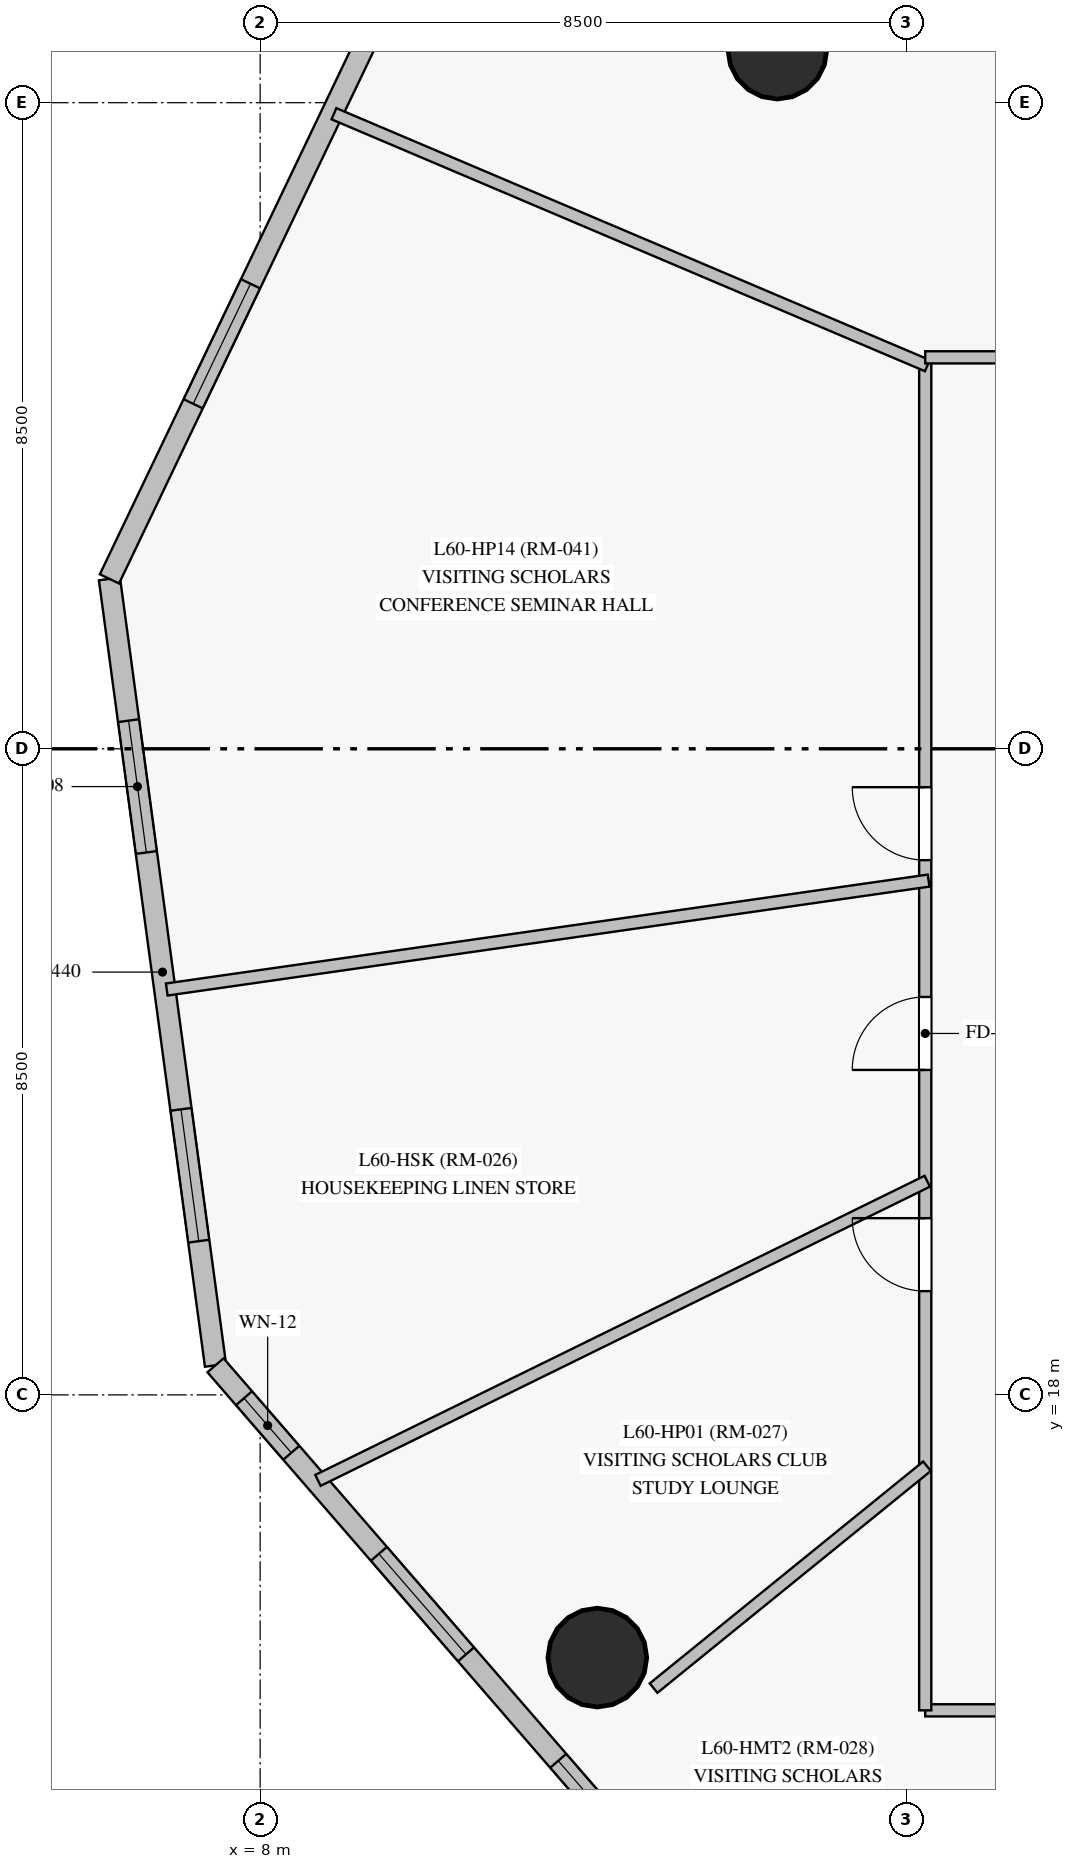
"""IFC4 building model, lengths in metres.
Left out: names, types, materials, properties, quantities, classifications, styles, units other than length and angle.
Written with IfcOpenShell. Run it as: python <this file> out.ifc"""

import sys

from ifc_helpers import new_model, si_unit, direction, frame, frame_2d, origin, origin_with_axes, origin_2d, place, context, subcontext, project, spatial, rectangle, circle, extrude, source, transform, mapped, element, fill, save


model = new_model("IFC4")
c1 = context("Model", 3, precision=1e-05, world=origin(), true_north=direction((0.0, 1.0)))
c2 = subcontext(c1, "Body", "Model", "MODEL_VIEW")
j1 = project(units=[si_unit("LENGTHUNIT", "METRE"), si_unit("PLANEANGLEUNIT", "RADIAN")], contexts=[c1])
p1 = place(None, origin())
s1 = spatial("IfcSite", under=j1, at=p1, CompositionType="ELEMENT")
p2 = place(p1, origin())
s2 = spatial("IfcBuilding", under=s1, at=p2, CompositionType="ELEMENT")
p3 = place(p2, frame((0.0, 0.0, 205.35)))
s3 = spatial("IfcBuildingStorey", under=s2, at=p3, CompositionType="ELEMENT", Elevation=205.35)
m1 = source(origin_with_axes(), c2, "Body", "SweptSolid", [
    extrude(circle(Radius=0.65, at=origin_2d()), origin(), (0.0, 0.0, 1.0), 3.05),
])
for number, where, z_axis, x_axis in (
    (1, (14.805, 35.698, 0.0), (0.0, 0.0, 1.0), (1.0, 0.0, 0.0)),
    (2, (12.436, 14.544, 0.0), (0.0, 0.0, 1.0), (1.0, 0.0, 0.0)),
):
    element("IfcColumn", number, at=place(p3, frame(where, z_axis=z_axis, x_axis=x_axis)), inside=s3, PredefinedType="COLUMN", context=c2, shape_type="MappedRepresentation", body=[
        mapped(m1, transform((0.0, 0.0, 0.0), scale=1.0)),
    ])
p4 = place(p3, frame((6.018, 28.735, 0.0), z_axis=(0.0, 0.0, 1.0), x_axis=(0.133628013706, -0.991031560523, 0.0)))
e3 = element("IfcWall", 3, at=p4, inside=s3, PredefinedType="SOLIDWALL", context=c2, shape_type="SweptSolid", body=[
    extrude(rectangle(XDim=10.439, YDim=0.28, at=frame_2d((5.22, 0.0))), origin(), (0.0, 0.0, 1.0), 2.775),
])
p5 = place(p4, frame((1.882, 0.0, 0.85)))
e4 = element("IfcOpeningElement", 4, at=p5, cuts=e3, PredefinedType="OPENING", context=c2, shape_type="SweptSolid", body=[
    extrude(rectangle(XDim=1.75, YDim=1.65, at=frame_2d((0.875, 0.825))), frame((0.0, 0.15, 0.0), z_axis=(0.0, -1.0, 0.0), x_axis=(1.0, 0.0, 0.0)), (0.0, 0.0, 1.0), 0.3),
])
p6 = place(p4, frame((7.042, 0.0, 0.85)))
e5 = element("IfcOpeningElement", 5, at=p6, cuts=e3, PredefinedType="OPENING", context=c2, shape_type="SweptSolid", body=[
    extrude(rectangle(XDim=1.75, YDim=1.65, at=frame_2d((0.875, 0.825))), frame((0.0, 0.15, 0.0), z_axis=(0.0, -1.0, 0.0), x_axis=(1.0, 0.0, 0.0)), (0.0, 0.0, 1.0), 0.3),
])
p7 = place(p3, frame((7.413, 18.389, 0.0), z_axis=(0.0, 0.0, 1.0), x_axis=(0.654908577936, -0.755708114648, 0.0)))
e6 = element("IfcWall", 6, at=p7, inside=s3, PredefinedType="SOLIDWALL", context=c2, shape_type="SweptSolid", body=[
    extrude(rectangle(XDim=13.544, YDim=0.28, at=frame_2d((6.772, 0.0))), origin(), (0.0, 0.0, 1.0), 2.775),
])
p8 = place(p7, frame((0.573, 0.0, 0.85)))
e7 = element("IfcOpeningElement", 7, at=p8, cuts=e6, PredefinedType="OPENING", context=c2, shape_type="SweptSolid", body=[
    extrude(rectangle(XDim=0.95, YDim=1.5, at=frame_2d((0.475, 0.75))), frame((0.0, 0.15, 0.0), z_axis=(0.0, -1.0, 0.0), x_axis=(1.0, 0.0, 0.0)), (0.0, 0.0, 1.0), 0.3),
])
p9 = place(p7, frame((3.282, 0.0, 0.85)))
e8 = element("IfcOpeningElement", 8, at=p9, cuts=e6, PredefinedType="OPENING", context=c2, shape_type="SweptSolid", body=[
    extrude(rectangle(XDim=1.75, YDim=1.65, at=frame_2d((0.875, 0.825))), frame((0.0, 0.15, 0.0), z_axis=(0.0, -1.0, 0.0), x_axis=(1.0, 0.0, 0.0)), (0.0, 0.0, 1.0), 0.3),
])
p10 = place(p7, frame((6.885, 0.0, 0.85)))
e9 = element("IfcOpeningElement", 9, at=p10, cuts=e6, PredefinedType="OPENING", context=c2, shape_type="SweptSolid", body=[
    extrude(rectangle(XDim=1.75, YDim=1.65, at=frame_2d((0.875, 0.825))), frame((0.0, 0.15, 0.0), z_axis=(0.0, -1.0, 0.0), x_axis=(1.0, 0.0, 0.0)), (0.0, 0.0, 1.0), 0.3),
])
p11 = place(p7, frame((10.488, 0.0, 0.85)))
e10 = element("IfcOpeningElement", 10, at=p11, cuts=e6, PredefinedType="OPENING", context=c2, shape_type="SweptSolid", body=[
    extrude(rectangle(XDim=1.75, YDim=1.65, at=frame_2d((0.875, 0.825))), frame((0.0, 0.15, 0.0), z_axis=(0.0, -1.0, 0.0), x_axis=(1.0, 0.0, 0.0)), (0.0, 0.0, 1.0), 0.3),
])
p12 = place(p3, frame((11.86, 40.955, 0.0), z_axis=(0.0, 0.0, 1.0), x_axis=(-0.431338769866, -0.902190038523, 0.0)))
e11 = element("IfcWall", 11, at=p12, inside=s3, PredefinedType="SOLIDWALL", context=c2, shape_type="SweptSolid", body=[
    extrude(rectangle(XDim=13.544, YDim=0.28, at=frame_2d((6.772, 0.0))), origin(), (0.0, 0.0, 1.0), 2.775),
])
p13 = place(p12, frame((2.529, 0.0, 0.85)))
e12 = element("IfcOpeningElement", 12, at=p13, cuts=e11, PredefinedType="OPENING", context=c2, shape_type="SweptSolid", body=[
    extrude(rectangle(XDim=1.75, YDim=1.65, at=frame_2d((0.875, 0.825))), frame((0.0, 0.15, 0.0), z_axis=(0.0, -1.0, 0.0), x_axis=(1.0, 0.0, 0.0)), (0.0, 0.0, 1.0), 0.3),
])
p14 = place(p12, frame((9.241, 0.0, 0.85)))
e13 = element("IfcOpeningElement", 13, at=p14, cuts=e11, PredefinedType="OPENING", context=c2, shape_type="SweptSolid", body=[
    extrude(rectangle(XDim=1.75, YDim=1.65, at=frame_2d((0.875, 0.825))), frame((0.0, 0.15, 0.0), z_axis=(0.0, -1.0, 0.0), x_axis=(1.0, 0.0, 0.0)), (0.0, 0.0, 1.0), 0.3),
])
p15 = place(p3, frame((41.8, 13.85, 0.0), z_axis=(0.0, 0.0, 1.0), x_axis=(-1.0, 0.0, 0.0)))
e14 = element("IfcWall", 14, at=p15, inside=s3, PredefinedType="PARTITIONING", context=c2, shape_type="SweptSolid", body=[
    extrude(rectangle(XDim=25.05, YDim=0.16, at=frame_2d((12.525, 0.0))), origin(), (0.0, 0.0, 1.0), 2.225),
])
p16 = place(p15, frame((1.62, 0.0, 0.0)))
e15 = element("IfcOpeningElement", 15, at=p16, cuts=e14, PredefinedType="OPENING", context=c2, shape_type="SweptSolid", body=[
    extrude(rectangle(XDim=0.96, YDim=2.15, at=frame_2d((0.48, 1.075))), frame((0.0, 0.09, 0.0), z_axis=(0.0, -1.0, 0.0), x_axis=(1.0, 0.0, 0.0)), (0.0, 0.0, 1.0), 0.18),
])
p17 = place(p15, frame((21.952, 0.0, 0.0)))
e16 = element("IfcOpeningElement", 16, at=p17, cuts=e14, PredefinedType="OPENING", context=c2, shape_type="SweptSolid", body=[
    extrude(rectangle(XDim=0.96, YDim=2.15, at=frame_2d((0.48, 1.075))), frame((0.0, 0.09, 0.0), z_axis=(0.0, -1.0, 0.0), x_axis=(1.0, 0.0, 0.0)), (0.0, 0.0, 1.0), 0.18),
])
p18 = place(p15, frame((18.312, 0.0, 0.0)))
e17 = element("IfcOpeningElement", 17, at=p18, cuts=e14, PredefinedType="OPENING", context=c2, shape_type="SweptSolid", body=[
    extrude(rectangle(XDim=0.96, YDim=2.15, at=frame_2d((0.48, 1.075))), frame((0.0, 0.09, 0.0), z_axis=(0.0, -1.0, 0.0), x_axis=(1.0, 0.0, 0.0)), (0.0, 0.0, 1.0), 0.18),
])
p19 = place(p15, frame((15.808, 0.0, 0.0)))
e18 = element("IfcOpeningElement", 18, at=p19, cuts=e14, PredefinedType="OPENING", context=c2, shape_type="SweptSolid", body=[
    extrude(rectangle(XDim=0.96, YDim=2.15, at=frame_2d((0.48, 1.075))), frame((0.0, 0.09, 0.0), z_axis=(0.0, -1.0, 0.0), x_axis=(1.0, 0.0, 0.0)), (0.0, 0.0, 1.0), 0.18),
])
p20 = place(p15, frame((12.79, 0.0, 0.0)))
e19 = element("IfcOpeningElement", 19, at=p20, cuts=e14, PredefinedType="OPENING", context=c2, shape_type="SweptSolid", body=[
    extrude(rectangle(XDim=0.96, YDim=2.15, at=frame_2d((0.48, 1.075))), frame((0.0, 0.09, 0.0), z_axis=(0.0, -1.0, 0.0), x_axis=(1.0, 0.0, 0.0)), (0.0, 0.0, 1.0), 0.18),
])
p21 = place(p15, frame((10.756, 0.0, 0.0)))
e20 = element("IfcOpeningElement", 20, at=p21, cuts=e14, PredefinedType="OPENING", context=c2, shape_type="SweptSolid", body=[
    extrude(rectangle(XDim=0.96, YDim=2.15, at=frame_2d((0.48, 1.075))), frame((0.0, 0.09, 0.0), z_axis=(0.0, -1.0, 0.0), x_axis=(1.0, 0.0, 0.0)), (0.0, 0.0, 1.0), 0.18),
])
p22 = place(p15, frame((8.292, 0.0, 0.0)))
e21 = element("IfcOpeningElement", 21, at=p22, cuts=e14, PredefinedType="OPENING", context=c2, shape_type="SweptSolid", body=[
    extrude(rectangle(XDim=0.96, YDim=2.15, at=frame_2d((0.48, 1.075))), frame((0.0, 0.09, 0.0), z_axis=(0.0, -1.0, 0.0), x_axis=(1.0, 0.0, 0.0)), (0.0, 0.0, 1.0), 0.18),
])
p23 = place(p15, frame((5.788, 0.0, 0.0)))
e22 = element("IfcOpeningElement", 22, at=p23, cuts=e14, PredefinedType="OPENING", context=c2, shape_type="SweptSolid", body=[
    extrude(rectangle(XDim=0.96, YDim=2.15, at=frame_2d((0.48, 1.075))), frame((0.0, 0.09, 0.0), z_axis=(0.0, -1.0, 0.0), x_axis=(1.0, 0.0, 0.0)), (0.0, 0.0, 1.0), 0.18),
])
p24 = place(p3, frame((16.75, 13.85, 0.0), z_axis=(0.0, 0.0, 1.0), x_axis=(0.0, 1.0, 0.0)))
e23 = element("IfcWall", 23, at=p24, inside=s3, PredefinedType="PARTITIONING", context=c2, shape_type="SweptSolid", body=[
    extrude(rectangle(XDim=17.8, YDim=0.16, at=frame_2d((8.9, 0.0))), origin(), (0.0, 0.0, 1.0), 2.325),
])
p25 = place(p24, frame((8.425, 0.0, 0.0)))
e24 = element("IfcOpeningElement", 24, at=p25, cuts=e23, PredefinedType="OPENING", context=c2, shape_type="SweptSolid", body=[
    extrude(rectangle(XDim=0.96, YDim=2.15, at=frame_2d((0.48, 1.075))), frame((0.0, 0.09, 0.0), z_axis=(0.0, -1.0, 0.0), x_axis=(1.0, 0.0, 0.0)), (0.0, 0.0, 1.0), 0.18),
])
p26 = place(p24, frame((5.515, 0.0, 0.0)))
e25 = element("IfcOpeningElement", 25, at=p26, cuts=e23, PredefinedType="OPENING", context=c2, shape_type="SweptSolid", body=[
    extrude(rectangle(XDim=0.96, YDim=2.15, at=frame_2d((0.48, 1.075))), frame((0.0, 0.09, 0.0), z_axis=(0.0, -1.0, 0.0), x_axis=(1.0, 0.0, 0.0)), (0.0, 0.0, 1.0), 0.18),
])
p27 = place(p24, frame((11.185, 0.0, 0.0)))
e26 = element("IfcOpeningElement", 26, at=p27, cuts=e23, PredefinedType="OPENING", context=c2, shape_type="SweptSolid", body=[
    extrude(rectangle(XDim=0.96, YDim=2.15, at=frame_2d((0.48, 1.075))), frame((0.0, 0.09, 0.0), z_axis=(0.0, -1.0, 0.0), x_axis=(1.0, 0.0, 0.0)), (0.0, 0.0, 1.0), 0.18),
])
p28 = place(p3, frame((6.771, 23.333, 0.0), z_axis=(0.0, 0.0, 1.0), x_axis=(0.989936469062, 0.141512498464, 0.0)))
e27 = element("IfcWall", 27, at=p28, inside=s3, PredefinedType="PARTITIONING", context=c2, shape_type="SweptSolid", body=[
    extrude(rectangle(XDim=10.125, YDim=0.16, at=frame_2d((5.062, 0.0))), origin(), (0.0, 0.0, 1.0), 2.775),
])
p29 = place(p3, frame((16.777, 20.811, 0.0), z_axis=(0.0, 0.0, 1.0), x_axis=(-0.897640670671, -0.440728063955, 0.0)))
e28 = element("IfcWall", 28, at=p29, inside=s3, PredefinedType="PARTITIONING", context=c2, shape_type="SweptSolid", body=[
    extrude(rectangle(XDim=8.93, YDim=0.16, at=frame_2d((4.465, 0.0))), origin(), (0.0, 0.0, 1.0), 2.775),
])
p30 = place(p3, frame((16.778, 31.541, 0.0), z_axis=(0.0, 0.0, 1.0), x_axis=(-0.920500527901, 0.390741318693, 0.0)))
e29 = element("IfcWall", 29, at=p30, inside=s3, PredefinedType="PARTITIONING", context=c2, shape_type="SweptSolid", body=[
    extrude(rectangle(XDim=8.481, YDim=0.16, at=frame_2d((4.24, 0.0))), origin(), (0.0, 0.0, 1.0), 2.775),
])
p31 = place(p3, frame((16.773, 17.062, 0.0), z_axis=(0.0, 0.0, 1.0), x_axis=(-0.776484627318, -0.630136194437, 0.0)))
e30 = element("IfcWall", 30, at=p31, inside=s3, PredefinedType="PARTITIONING", context=c2, shape_type="SweptSolid", body=[
    extrude(rectangle(XDim=4.633, YDim=0.16, at=frame_2d((2.316, 0.0))), origin(), (0.0, 0.0, 1.0), 2.225),
])
p32 = place(p3, frame((16.75, 31.65, 0.0), z_axis=(0.0, 0.0, 1.0), x_axis=(1.0, 0.0, 0.0)))
e31 = element("IfcWall", 31, at=p32, inside=s3, PredefinedType="PARTITIONING", context=c2, shape_type="SweptSolid", body=[
    extrude(rectangle(XDim=2.543, YDim=0.16, at=frame_2d((1.271, 0.0))), origin(), (0.0, 0.0, 1.0), 2.775),
])
m2 = source(origin_with_axes(), c2, "Body", "SweptSolid", [
    extrude(rectangle(XDim=1.75, YDim=1.65, at=frame_2d((0.875, 0.825))), frame((0.0, 0.03, 0.0), z_axis=(0.0, -1.0, 0.0), x_axis=(1.0, 0.0, 0.0)), (0.0, 0.0, 1.0), 0.06),
])
p33 = place(p5, origin())
e32 = element("IfcWindow", 32, at=p33, inside=s3, PartitioningType="SINGLE_PANEL", PredefinedType="WINDOW", context=c2, shape_type="MappedRepresentation", body=[
    mapped(m2, transform((0.0, 0.0, 0.0), scale=1.0)),
])
fill(e4, e32)
p34 = place(p6, origin())
e33 = element("IfcWindow", 33, at=p34, inside=s3, PartitioningType="SINGLE_PANEL", PredefinedType="WINDOW", context=c2, shape_type="MappedRepresentation", body=[
    mapped(m2, transform((0.0, 0.0, 0.0), scale=1.0)),
])
fill(e5, e33)
m3 = source(origin_with_axes(), c2, "Body", "SweptSolid", [
    extrude(rectangle(XDim=0.95, YDim=1.5, at=frame_2d((0.475, 0.75))), frame((0.0, 0.03, 0.0), z_axis=(0.0, -1.0, 0.0), x_axis=(1.0, 0.0, 0.0)), (0.0, 0.0, 1.0), 0.06),
])
p35 = place(p8, origin())
e34 = element("IfcWindow", 34, at=p35, inside=s3, PartitioningType="SINGLE_PANEL", PredefinedType="WINDOW", context=c2, shape_type="MappedRepresentation", body=[
    mapped(m3, transform((0.0, 0.0, 0.0), scale=1.0)),
])
fill(e7, e34)
p36 = place(p9, origin())
e35 = element("IfcWindow", 35, at=p36, inside=s3, PartitioningType="SINGLE_PANEL", PredefinedType="WINDOW", context=c2, shape_type="MappedRepresentation", body=[
    mapped(m2, transform((0.0, 0.0, 0.0), scale=1.0)),
])
fill(e8, e35)
p37 = place(p10, origin())
e36 = element("IfcWindow", 36, at=p37, inside=s3, PartitioningType="SINGLE_PANEL", PredefinedType="WINDOW", context=c2, shape_type="MappedRepresentation", body=[
    mapped(m2, transform((0.0, 0.0, 0.0), scale=1.0)),
])
fill(e9, e36)
p38 = place(p14, origin())
e37 = element("IfcWindow", 37, at=p38, inside=s3, PartitioningType="SINGLE_PANEL", PredefinedType="WINDOW", context=c2, shape_type="MappedRepresentation", body=[
    mapped(m2, transform((0.0, 0.0, 0.0), scale=1.0)),
])
fill(e13, e37)
m4 = source(origin_with_axes(), c2, "Body", "SweptSolid", [
    extrude(rectangle(XDim=0.96, YDim=2.15, at=frame_2d((0.48, 1.075))), frame((0.0, 0.025, 0.0), z_axis=(0.0, -1.0, 0.0), x_axis=(1.0, 0.0, 0.0)), (0.0, 0.0, 1.0), 0.05),
])
p39 = place(p25, origin())
e38 = element("IfcDoor", 38, at=p39, inside=s3, OperationType="SINGLE_SWING_LEFT", PredefinedType="DOOR", context=c2, shape_type="MappedRepresentation", body=[
    mapped(m4, transform((0.0, 0.0, 0.0), scale=1.0)),
])
fill(e24, e38)
p40 = place(p26, origin())
e39 = element("IfcDoor", 39, at=p40, inside=s3, OperationType="SINGLE_SWING_RIGHT", PredefinedType="DOOR", context=c2, shape_type="MappedRepresentation", body=[
    mapped(m4, transform((0.0, 0.0, 0.0), scale=1.0)),
])
fill(e25, e39)
p41 = place(p27, origin())
e40 = element("IfcDoor", 40, at=p41, inside=s3, OperationType="SINGLE_SWING_RIGHT", PredefinedType="DOOR", context=c2, shape_type="MappedRepresentation", body=[
    mapped(m4, transform((0.0, 0.0, 0.0), scale=1.0)),
])
fill(e26, e40)
save(model, sys.argv[1])
